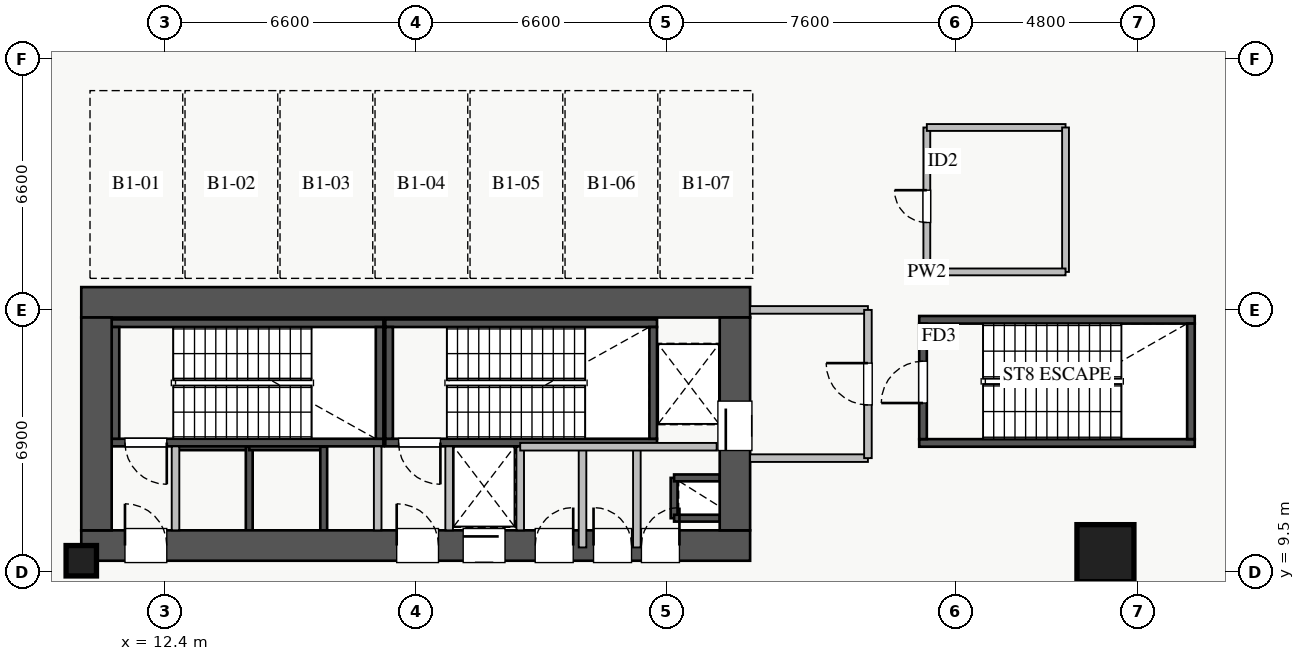
"""IFC4 building model, lengths in metres.
Left out: names, types, materials, properties, quantities, classifications, styles, units other than length and angle.
Written with IfcOpenShell. Run it as: python <this file> out.ifc"""

import sys

from ifc_helpers import new_model, si_unit, direction, frame, frame_2d, origin, origin_2d, place, context, subcontext, project, spatial, rectangle, extrude, source, transform, mapped, element, fill, save


model = new_model("IFC4")
c1 = context("Model", 3, precision=1e-05, world=origin(), true_north=direction((0.0, 1.0)))
c2 = subcontext(c1, "Body", "Model", "MODEL_VIEW")
j1 = project(units=[si_unit("LENGTHUNIT", "METRE"), si_unit("PLANEANGLEUNIT", "RADIAN")], contexts=[c1])
p1 = place(None, origin())
s1 = spatial("IfcSite", under=j1, at=p1, CompositionType="ELEMENT")
p2 = place(p1, origin())
s2 = spatial("IfcBuilding", under=s1, at=p2, CompositionType="ELEMENT")
p3 = place(p2, frame((0.0, 0.0, -4.8)))
s3 = spatial("IfcBuildingStorey", under=s2, at=p3, CompositionType="ELEMENT", Elevation=-4.8)
p4 = place(p3, frame((12.68, 12.8, 0.0), z_axis=(0.0, 0.0, 1.0), x_axis=(1.0, 0.0, 0.0)))
e1 = element("IfcWall", 1, at=p4, inside=s3, PredefinedType="SHEAR", context=c2, shape_type="SweptSolid", body=[
    extrude(rectangle(XDim=1.94, YDim=0.18, at=frame_2d((0.97, 0.0))), origin(), (0.0, 0.0, 1.0), 4.58),
])
p5 = place(p3, frame((14.62, 10.6, 0.0), z_axis=(0.0, 0.0, 1.0), x_axis=(0.0, 1.0, 0.0)))
e2 = element("IfcWall", 2, at=p5, inside=s3, PredefinedType="SHEAR", context=c2, shape_type="SweptSolid", body=[
    extrude(rectangle(XDim=2.2, YDim=0.18, at=frame_2d((1.1, 0.0))), origin(), (0.0, 0.0, 1.0), 4.58),
])
p6 = place(p3, frame((25.8, 10.92, 0.0), z_axis=(0.0, 0.0, 1.0), x_axis=(0.0, 1.0, 0.0)))
e3 = element("IfcWall", 3, at=p6, inside=s3, PredefinedType="SHEAR", context=c2, shape_type="SweptSolid", body=[
    extrude(rectangle(XDim=1.06, YDim=0.18, at=frame_2d((0.53, 0.0))), origin(), (0.0, 0.0, 1.0), 4.58),
])
for number, where, z_axis, x_axis in (
    (4, (25.8, 11.98, 0.0), (0.0, 0.0, 1.0), (1.0, 0.0, 0.0)),
    (5, (25.8, 10.92, 0.0), (0.0, 0.0, 1.0), (1.0, 0.0, 0.0)),
):
    element("IfcWall", number, at=place(p3, frame(where, z_axis=z_axis, x_axis=x_axis)), inside=s3, PredefinedType="SHEAR", context=c2, shape_type="SweptSolid", body=[
        extrude(rectangle(XDim=1.2, YDim=0.18, at=frame_2d((0.6, 0.0))), origin(), (0.0, 0.0, 1.0), 4.58),
    ])
p7 = place(p3, frame((14.62, 12.8, 0.0), z_axis=(0.0, 0.0, 1.0), x_axis=(1.0, 0.0, 0.0)))
e6 = element("IfcWall", 6, at=p7, inside=s3, PredefinedType="SHEAR", context=c2, shape_type="SweptSolid", body=[
    extrude(rectangle(XDim=1.96, YDim=0.18, at=frame_2d((0.98, 0.0))), origin(), (0.0, 0.0, 1.0), 4.58),
])
p8 = place(p3, frame((16.58, 10.6, 0.0), z_axis=(0.0, 0.0, 1.0), x_axis=(0.0, 1.0, 0.0)))
e7 = element("IfcWall", 7, at=p8, inside=s3, PredefinedType="SHEAR", context=c2, shape_type="SweptSolid", body=[
    extrude(rectangle(XDim=2.2, YDim=0.18, at=frame_2d((1.1, 0.0))), origin(), (0.0, 0.0, 1.0), 4.58),
])
p9 = place(p3, frame((19.88, 12.8, 0.0), z_axis=(0.0, 0.0, 1.0), x_axis=(1.0, 0.0, 0.0)))
e8 = element("IfcWall", 8, at=p9, inside=s3, PredefinedType="SHEAR", context=c2, shape_type="SweptSolid", body=[
    extrude(rectangle(XDim=1.87, YDim=0.18, at=frame_2d((0.935, 0.0))), origin(), (0.0, 0.0, 1.0), 4.58),
])
p10 = place(p3, frame((11.0, 12.91, 0.0), z_axis=(0.0, 0.0, 1.0), x_axis=(1.0, 0.0, 0.0)))
e9 = element("IfcWall", 9, at=p10, inside=s3, PredefinedType="SHEAR", context=c2, shape_type="SweptSolid", body=[
    extrude(rectangle(XDim=7.15, YDim=0.2, at=frame_2d((3.575, 0.0))), origin(), (0.0, 0.0, 1.0), 4.8),
])
p11 = place(p10, frame((0.35, 0.0, 0.0)))
e10 = element("IfcOpeningElement", 10, at=p11, cuts=e9, PredefinedType="OPENING", context=c2, shape_type="SweptSolid", body=[
    extrude(rectangle(XDim=1.1, YDim=2.05, at=frame_2d((0.55, 1.025))), frame((0.0, 0.11, 0.0), z_axis=(0.0, -1.0, 0.0), x_axis=(1.0, 0.0, 0.0)), (0.0, 0.0, 1.0), 0.22),
])
p12 = place(p3, frame((11.0, 16.05, 0.0), z_axis=(0.0, 0.0, 1.0), x_axis=(1.0, 0.0, 0.0)))
e11 = element("IfcWall", 11, at=p12, inside=s3, PredefinedType="SHEAR", context=c2, shape_type="SweptSolid", body=[
    extrude(rectangle(XDim=7.15, YDim=0.2, at=frame_2d((3.575, 0.0))), origin(), (0.0, 0.0, 1.0), 4.8),
])
for number, where, z_axis, x_axis in (
    (12, (11.1, 13.01, 0.0), (0.0, 0.0, 1.0), (0.0, 1.0, 0.0)),
    (13, (18.05, 13.01, 0.0), (0.0, 0.0, 1.0), (0.0, 1.0, 0.0)),
):
    element("IfcWall", number, at=place(p3, frame(where, z_axis=z_axis, x_axis=x_axis)), inside=s3, PredefinedType="SHEAR", context=c2, shape_type="SweptSolid", body=[
        extrude(rectangle(XDim=2.94, YDim=0.2, at=frame_2d((1.47, 0.0))), origin(), (0.0, 0.0, 1.0), 4.8),
    ])
p13 = place(p3, frame((18.2, 12.91, 0.0), z_axis=(0.0, 0.0, 1.0), x_axis=(1.0, 0.0, 0.0)))
e14 = element("IfcWall", 14, at=p13, inside=s3, PredefinedType="SHEAR", context=c2, shape_type="SweptSolid", body=[
    extrude(rectangle(XDim=7.15, YDim=0.2, at=frame_2d((3.575, 0.0))), origin(), (0.0, 0.0, 1.0), 4.8),
])
p14 = place(p13, frame((0.35, 0.0, 0.0)))
e15 = element("IfcOpeningElement", 15, at=p14, cuts=e14, PredefinedType="OPENING", context=c2, shape_type="SweptSolid", body=[
    extrude(rectangle(XDim=1.1, YDim=2.05, at=frame_2d((0.55, 1.025))), frame((0.0, 0.11, 0.0), z_axis=(0.0, -1.0, 0.0), x_axis=(1.0, 0.0, 0.0)), (0.0, 0.0, 1.0), 0.22),
])
p15 = place(p3, frame((18.2, 16.05, 0.0), z_axis=(0.0, 0.0, 1.0), x_axis=(1.0, 0.0, 0.0)))
e16 = element("IfcWall", 16, at=p15, inside=s3, PredefinedType="SHEAR", context=c2, shape_type="SweptSolid", body=[
    extrude(rectangle(XDim=7.15, YDim=0.2, at=frame_2d((3.575, 0.0))), origin(), (0.0, 0.0, 1.0), 4.8),
])
for number, where, z_axis, x_axis in (
    (17, (18.3, 13.01, 0.0), (0.0, 0.0, 1.0), (0.0, 1.0, 0.0)),
    (18, (25.25, 13.01, 0.0), (0.0, 0.0, 1.0), (0.0, 1.0, 0.0)),
):
    element("IfcWall", number, at=place(p3, frame(where, z_axis=z_axis, x_axis=x_axis)), inside=s3, PredefinedType="SHEAR", context=c2, shape_type="SweptSolid", body=[
        extrude(rectangle(XDim=2.94, YDim=0.2, at=frame_2d((1.47, 0.0))), origin(), (0.0, 0.0, 1.0), 4.8),
    ])
for number, where, z_axis, x_axis in (
    (19, (32.25, 12.9, 0.0), (0.0, 0.0, 1.0), (1.0, 0.0, 0.0)),
    (20, (32.25, 16.14, 0.0), (0.0, 0.0, 1.0), (1.0, 0.0, 0.0)),
):
    element("IfcWall", number, at=place(p3, frame(where, z_axis=z_axis, x_axis=x_axis)), inside=s3, PredefinedType="SHEAR", context=c2, shape_type="SweptSolid", body=[
        extrude(rectangle(XDim=7.25, YDim=0.2, at=frame_2d((3.625, 0.0))), origin(), (0.0, 0.0, 1.0), 4.8),
    ])
p16 = place(p3, frame((32.35, 13.0, 0.0), z_axis=(0.0, 0.0, 1.0), x_axis=(0.0, 1.0, 0.0)))
e21 = element("IfcWall", 21, at=p16, inside=s3, PredefinedType="SHEAR", context=c2, shape_type="SweptSolid", body=[
    extrude(rectangle(XDim=3.04, YDim=0.2, at=frame_2d((1.52, 0.0))), origin(), (0.0, 0.0, 1.0), 4.8),
])
p17 = place(p16, frame((0.95, 0.0, 0.0)))
e22 = element("IfcOpeningElement", 22, at=p17, cuts=e21, PredefinedType="OPENING", context=c2, shape_type="SweptSolid", body=[
    extrude(rectangle(XDim=1.1, YDim=2.05, at=frame_2d((0.55, 1.025))), frame((0.0, 0.11, 0.0), z_axis=(0.0, -1.0, 0.0), x_axis=(1.0, 0.0, 0.0)), (0.0, 0.0, 1.0), 0.22),
])
p18 = place(p3, frame((39.4, 13.0, 0.0), z_axis=(0.0, 0.0, 1.0), x_axis=(0.0, 1.0, 0.0)))
e23 = element("IfcWall", 23, at=p18, inside=s3, PredefinedType="SHEAR", context=c2, shape_type="SweptSolid", body=[
    extrude(rectangle(XDim=3.04, YDim=0.2, at=frame_2d((1.52, 0.0))), origin(), (0.0, 0.0, 1.0), 4.8),
])
p19 = place(p3, frame((10.2, 10.2, 0.0), z_axis=(0.0, 0.0, 1.0), x_axis=(1.0, 0.0, 0.0)))
e24 = element("IfcWall", 24, at=p19, inside=s3, PredefinedType="SHEAR", context=c2, shape_type="SweptSolid", body=[
    extrude(rectangle(XDim=17.6, YDim=0.8, at=frame_2d((8.8, 0.0))), origin(), (0.0, 0.0, 1.0), 4.8),
])
p20 = place(p19, frame((1.15, 0.0, 0.0)))
e25 = element("IfcOpeningElement", 25, at=p20, cuts=e24, PredefinedType="OPENING", context=c2, shape_type="SweptSolid", body=[
    extrude(rectangle(XDim=1.1, YDim=2.05, at=frame_2d((0.55, 1.025))), frame((0.0, 0.41, 0.0), z_axis=(0.0, -1.0, 0.0), x_axis=(1.0, 0.0, 0.0)), (0.0, 0.0, 1.0), 0.82),
])
p21 = place(p19, frame((8.3, 0.0, 0.0)))
e26 = element("IfcOpeningElement", 26, at=p21, cuts=e24, PredefinedType="OPENING", context=c2, shape_type="SweptSolid", body=[
    extrude(rectangle(XDim=1.1, YDim=2.05, at=frame_2d((0.55, 1.025))), frame((0.0, 0.41, 0.0), z_axis=(0.0, -1.0, 0.0), x_axis=(1.0, 0.0, 0.0)), (0.0, 0.0, 1.0), 0.82),
])
p22 = place(p19, frame((10.05, 0.0, 0.0)))
e27 = element("IfcOpeningElement", 27, at=p22, cuts=e24, PredefinedType="OPENING", context=c2, shape_type="SweptSolid", body=[
    extrude(rectangle(XDim=1.1, YDim=2.05, at=frame_2d((0.55, 1.025))), frame((0.0, 0.41, 0.0), z_axis=(0.0, -1.0, 0.0), x_axis=(1.0, 0.0, 0.0)), (0.0, 0.0, 1.0), 0.82),
])
p23 = place(p19, frame((14.74, 0.0, 0.0)))
e28 = element("IfcOpeningElement", 28, at=p23, cuts=e24, PredefinedType="OPENING", context=c2, shape_type="SweptSolid", body=[
    extrude(rectangle(XDim=1.0, YDim=2.05, at=frame_2d((0.5, 1.025))), frame((0.0, 0.41, 0.0), z_axis=(0.0, -1.0, 0.0), x_axis=(1.0, 0.0, 0.0)), (0.0, 0.0, 1.0), 0.82),
])
p24 = place(p19, frame((11.945, 0.0, 0.0)))
e29 = element("IfcOpeningElement", 29, at=p24, cuts=e24, PredefinedType="OPENING", context=c2, shape_type="SweptSolid", body=[
    extrude(rectangle(XDim=1.0, YDim=2.05, at=frame_2d((0.5, 1.025))), frame((0.0, 0.41, 0.0), z_axis=(0.0, -1.0, 0.0), x_axis=(1.0, 0.0, 0.0)), (0.0, 0.0, 1.0), 0.82),
])
p25 = place(p19, frame((13.48, 0.0, 0.0)))
e30 = element("IfcOpeningElement", 30, at=p25, cuts=e24, PredefinedType="OPENING", context=c2, shape_type="SweptSolid", body=[
    extrude(rectangle(XDim=1.0, YDim=2.05, at=frame_2d((0.5, 1.025))), frame((0.0, 0.41, 0.0), z_axis=(0.0, -1.0, 0.0), x_axis=(1.0, 0.0, 0.0)), (0.0, 0.0, 1.0), 0.82),
])
p26 = place(p3, frame((10.2, 16.6, 0.0), z_axis=(0.0, 0.0, 1.0), x_axis=(1.0, 0.0, 0.0)))
e31 = element("IfcWall", 31, at=p26, inside=s3, PredefinedType="SHEAR", context=c2, shape_type="SweptSolid", body=[
    extrude(rectangle(XDim=17.6, YDim=0.8, at=frame_2d((8.8, 0.0))), origin(), (0.0, 0.0, 1.0), 4.8),
])
p27 = place(p3, frame((10.6, 10.6, 0.0), z_axis=(0.0, 0.0, 1.0), x_axis=(0.0, 1.0, 0.0)))
e32 = element("IfcWall", 32, at=p27, inside=s3, PredefinedType="SHEAR", context=c2, shape_type="SweptSolid", body=[
    extrude(rectangle(XDim=5.6, YDim=0.8, at=frame_2d((2.8, 0.0))), origin(), (0.0, 0.0, 1.0), 4.8),
])
p28 = place(p3, frame((27.4, 10.6, 0.0), z_axis=(0.0, 0.0, 1.0), x_axis=(0.0, 1.0, 0.0)))
e33 = element("IfcWall", 33, at=p28, inside=s3, PredefinedType="SHEAR", context=c2, shape_type="SweptSolid", body=[
    extrude(rectangle(XDim=5.6, YDim=0.8, at=frame_2d((2.8, 0.0))), origin(), (0.0, 0.0, 1.0), 4.8),
])
p29 = place(p28, frame((2.1, 0.0, 0.0)))
e34 = element("IfcOpeningElement", 34, at=p29, cuts=e33, PredefinedType="OPENING", context=c2, shape_type="SweptSolid", body=[
    extrude(rectangle(XDim=1.3, YDim=2.05, at=frame_2d((0.65, 1.025))), frame((0.0, 0.41, 0.0), z_axis=(0.0, -1.0, 0.0), x_axis=(1.0, 0.0, 0.0)), (0.0, 0.0, 1.0), 0.82),
])
m1 = source(origin(), c2, "Body", "SweptSolid", [
    extrude(rectangle(XDim=1.5, YDim=1.5, at=origin_2d()), origin(), (0.0, 0.0, 1.0), 4.8),
])
p30 = place(p3, frame((37.15, 10.0, 0.0), z_axis=(0.0, 0.0, 1.0), x_axis=(1.0, 0.0, 0.0)))
e35 = element("IfcColumn", 35, at=p30, inside=s3, PredefinedType="COLUMN", context=c2, shape_type="MappedRepresentation", body=[
    mapped(m1, transform((0.0, 0.0, 0.0), x_axis=(1.0, 0.0, 0.0), y_axis=(0.0, 1.0, 0.0), z_axis=(0.0, 0.0, 1.0), scale=1.0)),
])
m2 = source(origin(), c2, "Body", "SweptSolid", [
    extrude(rectangle(XDim=0.8, YDim=0.8, at=origin_2d()), origin(), (0.0, 0.0, 1.0), 4.8),
])
p31 = place(p3, frame((10.2, 9.8, 0.0), z_axis=(0.0, 0.0, 1.0), x_axis=(1.0, 0.0, 0.0)))
e36 = element("IfcColumn", 36, at=p31, inside=s3, PredefinedType="PILASTER", context=c2, shape_type="MappedRepresentation", body=[
    mapped(m2, transform((0.0, 0.0, 0.0), x_axis=(1.0, 0.0, 0.0), y_axis=(0.0, 1.0, 0.0), z_axis=(0.0, 0.0, 1.0), scale=1.0)),
])
p32 = place(p3, frame((27.8, 16.4, 0.0), z_axis=(0.0, 0.0, 1.0), x_axis=(1.0, 0.0, 0.0)))
e37 = element("IfcWall", 37, at=p32, inside=s3, PredefinedType="PARTITIONING", context=c2, shape_type="SweptSolid", body=[
    extrude(rectangle(XDim=3.1, YDim=0.2, at=frame_2d((1.55, 0.0))), origin(), (0.0, 0.0, 1.0), 3.875),
])
p33 = place(p3, frame((27.8, 12.5, 0.0), z_axis=(0.0, 0.0, 1.0), x_axis=(1.0, 0.0, 0.0)))
e38 = element("IfcWall", 38, at=p33, inside=s3, PredefinedType="PARTITIONING", context=c2, shape_type="SweptSolid", body=[
    extrude(rectangle(XDim=3.1, YDim=0.2, at=frame_2d((1.55, 0.0))), origin(), (0.0, 0.0, 1.0), 3.575),
])
p34 = place(p3, frame((30.9, 12.5, 0.0), z_axis=(0.0, 0.0, 1.0), x_axis=(0.0, 1.0, 0.0)))
e39 = element("IfcWall", 39, at=p34, inside=s3, PredefinedType="PARTITIONING", context=c2, shape_type="SweptSolid", body=[
    extrude(rectangle(XDim=3.9, YDim=0.2, at=frame_2d((1.95, 0.0))), origin(), (0.0, 0.0, 1.0), 4.58),
])
p35 = place(p34, frame((1.4, 0.0, 0.0)))
e40 = element("IfcOpeningElement", 40, at=p35, cuts=e39, PredefinedType="OPENING", context=c2, shape_type="SweptSolid", body=[
    extrude(rectangle(XDim=1.1, YDim=2.05, at=frame_2d((0.55, 1.025))), frame((0.0, 0.11, 0.0), z_axis=(0.0, -1.0, 0.0), x_axis=(1.0, 0.0, 0.0)), (0.0, 0.0, 1.0), 0.22),
])
for number, where, z_axis, x_axis in (
    (41, (12.68, 10.6, 0.0), (0.0, 0.0, 1.0), (0.0, 1.0, 0.0)),
    (42, (18.0, 10.6, 0.0), (0.0, 0.0, 1.0), (0.0, 1.0, 0.0)),
    (43, (19.88, 10.6, 0.0), (0.0, 0.0, 1.0), (0.0, 1.0, 0.0)),
):
    element("IfcWall", number, at=place(p3, frame(where, z_axis=z_axis, x_axis=x_axis)), inside=s3, PredefinedType="PARTITIONING", context=c2, shape_type="SweptSolid", body=[
        extrude(rectangle(XDim=2.21, YDim=0.2, at=frame_2d((1.105, 0.0))), origin(), (0.0, 0.0, 1.0), 4.58),
    ])
p36 = place(p3, frame((24.82, 10.15, 0.0), z_axis=(0.0, 0.0, 1.0), x_axis=(0.0, 1.0, 0.0)))
e44 = element("IfcWall", 44, at=p36, inside=s3, PredefinedType="PARTITIONING", context=c2, shape_type="SweptSolid", body=[
    extrude(rectangle(XDim=2.65, YDim=0.2, at=frame_2d((1.325, 0.0))), origin(), (0.0, 0.0, 1.0), 4.58),
])
p37 = place(p3, frame((21.75, 10.6, 0.0), z_axis=(0.0, 0.0, 1.0), x_axis=(0.0, 1.0, 0.0)))
e45 = element("IfcWall", 45, at=p37, inside=s3, PredefinedType="PARTITIONING", context=c2, shape_type="SweptSolid", body=[
    extrude(rectangle(XDim=2.2, YDim=0.2, at=frame_2d((1.1, 0.0))), origin(), (0.0, 0.0, 1.0), 4.58),
])
p38 = place(p3, frame((23.39, 10.15, 0.0), z_axis=(0.0, 0.0, 1.0), x_axis=(0.0, 1.0, 0.0)))
e46 = element("IfcWall", 46, at=p38, inside=s3, PredefinedType="PARTITIONING", context=c2, shape_type="SweptSolid", body=[
    extrude(rectangle(XDim=2.65, YDim=0.2, at=frame_2d((1.325, 0.0))), origin(), (0.0, 0.0, 1.0), 4.58),
])
p39 = place(p3, frame((21.75, 12.8, 0.0), z_axis=(0.0, 0.0, 1.0), x_axis=(1.0, 0.0, 0.0)))
e47 = element("IfcWall", 47, at=p39, inside=s3, PredefinedType="PARTITIONING", context=c2, shape_type="SweptSolid", body=[
    extrude(rectangle(XDim=5.17, YDim=0.2, at=frame_2d((2.585, 0.0))), origin(), (0.0, 0.0, 1.0), 4.58),
])
p40 = place(p3, frame((32.45, 17.4, 0.0), z_axis=(0.0, 0.0, 1.0), x_axis=(0.0, 1.0, 0.0)))
e48 = element("IfcWall", 48, at=p40, inside=s3, PredefinedType="PARTITIONING", context=c2, shape_type="SweptSolid", body=[
    extrude(rectangle(XDim=3.8, YDim=0.18, at=frame_2d((1.9, 0.0))), origin(), (0.0, 0.0, 1.0), 4.58),
])
p41 = place(p40, frame((1.3, 0.0, 0.0)))
e49 = element("IfcOpeningElement", 49, at=p41, cuts=e48, PredefinedType="OPENING", context=c2, shape_type="SweptSolid", body=[
    extrude(rectangle(XDim=0.85, YDim=2.05, at=frame_2d((0.425, 1.025))), frame((0.0, 0.1, 0.0), z_axis=(0.0, -1.0, 0.0), x_axis=(1.0, 0.0, 0.0)), (0.0, 0.0, 1.0), 0.2),
])
p42 = place(p3, frame((32.45, 21.2, 0.0), z_axis=(0.0, 0.0, 1.0), x_axis=(1.0, 0.0, 0.0)))
e50 = element("IfcWall", 50, at=p42, inside=s3, PredefinedType="PARTITIONING", context=c2, shape_type="SweptSolid", body=[
    extrude(rectangle(XDim=3.65, YDim=0.18, at=frame_2d((1.825, 0.0))), origin(), (0.0, 0.0, 1.0), 4.58),
])
p43 = place(p3, frame((36.1, 17.4, 0.0), z_axis=(0.0, 0.0, 1.0), x_axis=(0.0, 1.0, 0.0)))
e51 = element("IfcWall", 51, at=p43, inside=s3, PredefinedType="PARTITIONING", context=c2, shape_type="SweptSolid", body=[
    extrude(rectangle(XDim=3.8, YDim=0.18, at=frame_2d((1.9, 0.0))), origin(), (0.0, 0.0, 1.0), 4.58),
])
p44 = place(p3, frame((32.45, 17.4, 0.0), z_axis=(0.0, 0.0, 1.0), x_axis=(1.0, 0.0, 0.0)))
e52 = element("IfcWall", 52, at=p44, inside=s3, PredefinedType="PARTITIONING", context=c2, shape_type="SweptSolid", body=[
    extrude(rectangle(XDim=3.65, YDim=0.18, at=frame_2d((1.825, 0.0))), origin(), (0.0, 0.0, 1.0), 4.58),
])
m3 = source(origin(), c2, "Body", "SweptSolid", [
    extrude(rectangle(XDim=1.3, YDim=2.05, at=frame_2d((0.65, 1.025))), frame((0.0, 0.025, 0.0), z_axis=(0.0, -1.0, 0.0), x_axis=(1.0, 0.0, 0.0)), (0.0, 0.0, 1.0), 0.05),
])
p45 = place(p29, origin())
e53 = element("IfcDoor", 53, at=p45, inside=s3, OperationType="SLIDING_TO_RIGHT", PredefinedType="DOOR", context=c2, shape_type="MappedRepresentation", body=[
    mapped(m3, transform((0.0, 0.0, 0.0), x_axis=(1.0, 0.0, 0.0), y_axis=(0.0, 1.0, 0.0), z_axis=(0.0, 0.0, 1.0), scale=1.0)),
])
fill(e34, e53)
m4 = source(origin(), c2, "Body", "SweptSolid", [
    extrude(rectangle(XDim=1.1, YDim=2.05, at=frame_2d((0.55, 1.025))), frame((0.0, 0.025, 0.0), z_axis=(0.0, -1.0, 0.0), x_axis=(1.0, 0.0, 0.0)), (0.0, 0.0, 1.0), 0.05),
])
p46 = place(p20, origin())
e54 = element("IfcDoor", 54, at=p46, inside=s3, OperationType="SINGLE_SWING_LEFT", PredefinedType="DOOR", context=c2, shape_type="MappedRepresentation", body=[
    mapped(m4, transform((0.0, 0.0, 0.0), x_axis=(1.0, 0.0, 0.0), y_axis=(0.0, 1.0, 0.0), z_axis=(0.0, 0.0, 1.0), scale=1.0)),
])
fill(e25, e54)
p47 = place(p11, frame((1.1, 0.0, 0.0), z_axis=(0.0, 0.0, 1.0), x_axis=(-1.0, 0.0, 0.0)))
e55 = element("IfcDoor", 55, at=p47, inside=s3, OperationType="SINGLE_SWING_RIGHT", PredefinedType="DOOR", context=c2, shape_type="MappedRepresentation", body=[
    mapped(m4, transform((0.0, 0.0, 0.0), x_axis=(1.0, 0.0, 0.0), y_axis=(0.0, 1.0, 0.0), z_axis=(0.0, 0.0, 1.0), scale=1.0)),
])
fill(e10, e55)
p48 = place(p21, origin())
e56 = element("IfcDoor", 56, at=p48, inside=s3, OperationType="SINGLE_SWING_LEFT", PredefinedType="DOOR", context=c2, shape_type="MappedRepresentation", body=[
    mapped(m4, transform((0.0, 0.0, 0.0), x_axis=(1.0, 0.0, 0.0), y_axis=(0.0, 1.0, 0.0), z_axis=(0.0, 0.0, 1.0), scale=1.0)),
])
fill(e26, e56)
p49 = place(p14, frame((1.1, 0.0, 0.0), z_axis=(0.0, 0.0, 1.0), x_axis=(-1.0, 0.0, 0.0)))
e57 = element("IfcDoor", 57, at=p49, inside=s3, OperationType="SINGLE_SWING_RIGHT", PredefinedType="DOOR", context=c2, shape_type="MappedRepresentation", body=[
    mapped(m4, transform((0.0, 0.0, 0.0), x_axis=(1.0, 0.0, 0.0), y_axis=(0.0, 1.0, 0.0), z_axis=(0.0, 0.0, 1.0), scale=1.0)),
])
fill(e15, e57)
p50 = place(p22, origin())
e58 = element("IfcDoor", 58, at=p50, inside=s3, OperationType="SLIDING_TO_RIGHT", PredefinedType="DOOR", context=c2, shape_type="MappedRepresentation", body=[
    mapped(m4, transform((0.0, 0.0, 0.0), x_axis=(1.0, 0.0, 0.0), y_axis=(0.0, 1.0, 0.0), z_axis=(0.0, 0.0, 1.0), scale=1.0)),
])
fill(e27, e58)
m5 = source(origin(), c2, "Body", "SweptSolid", [
    extrude(rectangle(XDim=1.0, YDim=2.05, at=frame_2d((0.5, 1.025))), frame((0.0, 0.025, 0.0), z_axis=(0.0, -1.0, 0.0), x_axis=(1.0, 0.0, 0.0)), (0.0, 0.0, 1.0), 0.05),
])
p51 = place(p23, origin())
e59 = element("IfcDoor", 59, at=p51, inside=s3, OperationType="SINGLE_SWING_RIGHT", PredefinedType="DOOR", context=c2, shape_type="MappedRepresentation", body=[
    mapped(m5, transform((0.0, 0.0, 0.0), x_axis=(1.0, 0.0, 0.0), y_axis=(0.0, 1.0, 0.0), z_axis=(0.0, 0.0, 1.0), scale=1.0)),
])
fill(e28, e59)
p52 = place(p24, origin())
e60 = element("IfcDoor", 60, at=p52, inside=s3, OperationType="SINGLE_SWING_RIGHT", PredefinedType="DOOR", context=c2, shape_type="MappedRepresentation", body=[
    mapped(m5, transform((0.0, 0.0, 0.0), x_axis=(1.0, 0.0, 0.0), y_axis=(0.0, 1.0, 0.0), z_axis=(0.0, 0.0, 1.0), scale=1.0)),
])
fill(e29, e60)
p53 = place(p25, origin())
e61 = element("IfcDoor", 61, at=p53, inside=s3, OperationType="SINGLE_SWING_LEFT", PredefinedType="DOOR", context=c2, shape_type="MappedRepresentation", body=[
    mapped(m5, transform((0.0, 0.0, 0.0), x_axis=(1.0, 0.0, 0.0), y_axis=(0.0, 1.0, 0.0), z_axis=(0.0, 0.0, 1.0), scale=1.0)),
])
fill(e30, e61)
p54 = place(p17, origin())
e62 = element("IfcDoor", 62, at=p54, inside=s3, OperationType="SINGLE_SWING_LEFT", PredefinedType="DOOR", context=c2, shape_type="MappedRepresentation", body=[
    mapped(m4, transform((0.0, 0.0, 0.0), x_axis=(1.0, 0.0, 0.0), y_axis=(0.0, 1.0, 0.0), z_axis=(0.0, 0.0, 1.0), scale=1.0)),
])
fill(e22, e62)
p55 = place(p35, origin())
e63 = element("IfcDoor", 63, at=p55, inside=s3, OperationType="SINGLE_SWING_RIGHT", PredefinedType="DOOR", context=c2, shape_type="MappedRepresentation", body=[
    mapped(m4, transform((0.0, 0.0, 0.0), x_axis=(1.0, 0.0, 0.0), y_axis=(0.0, 1.0, 0.0), z_axis=(0.0, 0.0, 1.0), scale=1.0)),
])
fill(e40, e63)
m6 = source(origin(), c2, "Body", "SweptSolid", [
    extrude(rectangle(XDim=0.85, YDim=2.05, at=frame_2d((0.425, 1.025))), frame((0.0, 0.025, 0.0), z_axis=(0.0, -1.0, 0.0), x_axis=(1.0, 0.0, 0.0)), (0.0, 0.0, 1.0), 0.05),
])
p56 = place(p41, origin())
e64 = element("IfcDoor", 64, at=p56, inside=s3, OperationType="SINGLE_SWING_RIGHT", PredefinedType="DOOR", context=c2, shape_type="MappedRepresentation", body=[
    mapped(m6, transform((0.0, 0.0, 0.0), x_axis=(1.0, 0.0, 0.0), y_axis=(0.0, 1.0, 0.0), z_axis=(0.0, 0.0, 1.0), scale=1.0)),
])
fill(e49, e64)
save(model, sys.argv[1])
